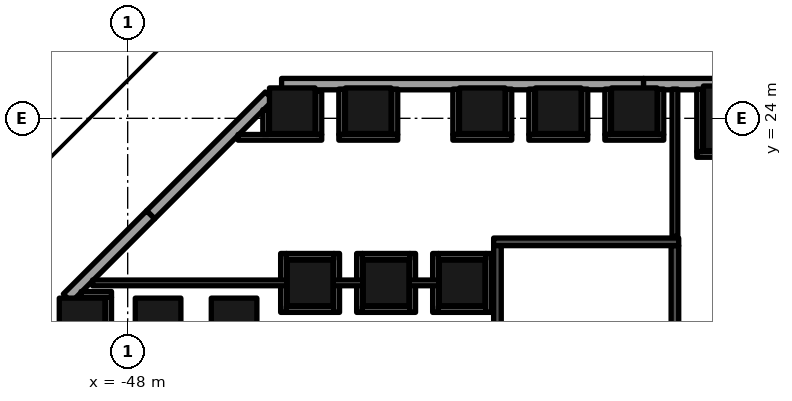
"""IFC4 building model, lengths in metres.
Left out: names, types, materials, properties, quantities, classifications, styles, units other than length and angle.
Written with IfcOpenShell. Run it as: python <this file> out.ifc"""

import sys

from ifc_helpers import new_model, si_unit, direction, frame, frame_2d, origin, origin_2d, place, context, subcontext, project, spatial, rectangle, extrude, element, fill, save


model = new_model("IFC4")
c1 = context("Model", 3, precision=1e-05, world=origin(), true_north=direction((0.0, 1.0)))
c2 = subcontext(c1, "Body", "Model", "MODEL_VIEW")
j1 = project(units=[si_unit("LENGTHUNIT", "METRE"), si_unit("PLANEANGLEUNIT", "RADIAN")], contexts=[c1])
p1 = place(None, origin())
s1 = spatial("IfcSite", under=j1, at=p1, CompositionType="ELEMENT")
p2 = place(p1, origin())
s2 = spatial("IfcBuilding", under=s1, at=p2, CompositionType="ELEMENT")
p3 = place(p2, origin())
s3 = spatial("IfcBuildingStorey", under=s2, at=p3, CompositionType="ELEMENT", Elevation=0.0)
p4 = place(p3, frame((-32.0, 24.0, 0.0), z_axis=(0.0, 0.0, 1.0), x_axis=(1.0, 0.0, 0.0)))
e1 = element("IfcColumn", 1, at=p4, inside=s3, PredefinedType="COLUMN", context=c2, shape_type="SweptSolid", body=[
    extrude(rectangle(XDim=1.7, YDim=1.7, at=origin_2d()), origin(), (0.0, 0.0, 1.0), 9.0),
])
for number, where, z_axis, x_axis in (
    (2, (-39.2, 19.669, 0.0), (0.0, 0.0, 1.0), (1.0, 0.0, 0.0)),
    (3, (-34.669, 24.2, 0.0), (0.0, 0.0, 1.0), (1.0, 0.0, 0.0)),
    (4, (-41.2, 19.669, 0.0), (0.0, 0.0, 1.0), (1.0, 0.0, 0.0)),
    (5, (-36.669, 24.2, 0.0), (0.0, 0.0, 1.0), (1.0, 0.0, 0.0)),
    (6, (-43.2, 19.669, 0.0), (0.0, 0.0, 1.0), (1.0, 0.0, 0.0)),
    (7, (-38.669, 24.2, 0.0), (0.0, 0.0, 1.0), (1.0, 0.0, 0.0)),
    (8, (-45.2, 18.669, 0.0), (0.0, 0.0, 1.0), (1.0, 0.0, 0.0)),
    (9, (-47.2, 18.669, 0.0), (0.0, 0.0, 1.0), (1.0, 0.0, 0.0)),
    (10, (-41.669, 24.2, 0.0), (0.0, 0.0, 1.0), (1.0, 0.0, 0.0)),
    (11, (-49.2, 18.669, 0.0), (0.0, 0.0, 1.0), (1.0, 0.0, 0.0)),
    (12, (-43.669, 24.2, 0.0), (0.0, 0.0, 1.0), (1.0, 0.0, 0.0)),
):
    element("IfcColumn", number, at=place(p3, frame(where, z_axis=z_axis, x_axis=x_axis)), inside=s3, PredefinedType="COLUMN", context=c2, shape_type="SweptSolid", body=[
        extrude(rectangle(XDim=1.2, YDim=1.2, at=origin_2d()), origin(), (0.0, 0.0, 1.0), 9.0),
    ])
for number, where, z_axis, x_axis in (
    (13, (-24.904, 24.9, 0.0), (0.0, 0.0, 1.0), (-1.0, 0.0, 0.0)),
    (14, (-34.427, 24.9, 0.0), (0.0, 0.0, 1.0), (-1.0, 0.0, 0.0)),
):
    element("IfcWall", number, at=place(p3, frame(where, z_axis=z_axis, x_axis=x_axis)), inside=s3, PredefinedType="SOLIDWALL", context=c2, shape_type="SweptSolid", body=[
        extrude(rectangle(XDim=9.523, YDim=0.3, at=frame_2d((4.761, 0.0))), origin(), (0.0, 0.0, 1.0), 7.6),
    ])
p5 = place(p3, frame((-44.271, 24.588, 0.0), z_axis=(0.0, 0.0, 1.0), x_axis=(-0.707079166839, -0.707134394455, 0.0)))
e15 = element("IfcWall", 15, at=p5, inside=s3, PredefinedType="ELEMENTEDWALL", context=c2, shape_type="SweptSolid", body=[
    extrude(rectangle(XDim=4.421, YDim=0.3, at=frame_2d((2.21, 0.0))), origin(), (0.0, 0.0, 1.0), 7.6),
])
p6 = place(p5, frame((1.021, 0.0, 0.0)))
e16 = element("IfcOpeningElement", 16, at=p6, cuts=e15, PredefinedType="OPENING", context=c2, shape_type="SweptSolid", body=[
    extrude(rectangle(XDim=3.0, YDim=2.7, at=frame_2d((1.5, 1.35))), frame((0.0, 0.16, 0.0), z_axis=(0.0, -1.0, 0.0), x_axis=(1.0, 0.0, 0.0)), (0.0, 0.0, 1.0), 0.32),
])
p7 = place(p3, frame((-47.397, 21.462, 0.0), z_axis=(0.0, 0.0, 1.0), x_axis=(-0.707146179809, -0.707067380369, 0.0)))
e17 = element("IfcWall", 17, at=p7, inside=s3, PredefinedType="SOLIDWALL", context=c2, shape_type="SweptSolid", body=[
    extrude(rectangle(XDim=3.098, YDim=0.3, at=frame_2d((1.549, 0.0))), origin(), (0.0, 0.0, 1.0), 7.6),
])
p8 = place(p3, frame((-42.75, 24.85, 9.0), z_axis=(0.0, 0.0, 1.0), x_axis=(-1.0, 0.0, 0.0)))
e18 = element("IfcWall", 18, at=p8, inside=s3, PredefinedType="PARAPET", context=c2, shape_type="SweptSolid", body=[
    extrude(rectangle(XDim=1.25, YDim=0.3, at=frame_2d((0.625, 0.0))), origin(), (0.0, 0.0, 1.0), 1.1),
])
p9 = place(p3, frame((-44.042, 24.745, 9.0), z_axis=(0.0, 0.0, 1.0), x_axis=(-0.7071215324, -0.707092029666, 0.0)))
e19 = element("IfcWall", 19, at=p9, inside=s3, PredefinedType="PARAPET", context=c2, shape_type="SweptSolid", body=[
    extrude(rectangle(XDim=8.275, YDim=0.3, at=frame_2d((4.138, 0.0))), origin(), (0.0, 0.0, 1.0), 1.1),
])
p10 = place(p3, frame((-49.85, 18.79, 9.0), z_axis=(0.0, 0.0, 1.0), x_axis=(0.0, -1.0, 0.0)))
e20 = element("IfcWall", 20, at=p10, inside=s3, PredefinedType="PARAPET", context=c2, shape_type="SweptSolid", body=[
    extrude(rectangle(XDim=14.698, YDim=0.3, at=frame_2d((7.349, 0.0))), origin(), (0.0, 0.0, 1.0), 1.1),
])
p11 = place(p3, frame((-38.37, 20.75, 0.0), z_axis=(0.0, 0.0, 1.0), x_axis=(1.0, 0.0, 0.0)))
e21 = element("IfcWall", 21, at=p11, inside=s3, PredefinedType="SOLIDWALL", context=c2, shape_type="SweptSolid", body=[
    extrude(rectangle(XDim=4.87, YDim=0.2, at=frame_2d((2.435, 0.0))), origin(), (0.0, 0.0, 1.0), 8.5),
])
p12 = place(p3, frame((-38.27, 14.0, 0.0), z_axis=(0.0, 0.0, 1.0), x_axis=(0.0, 1.0, 0.0)))
e22 = element("IfcWall", 22, at=p12, inside=s3, PredefinedType="SOLIDWALL", context=c2, shape_type="SweptSolid", body=[
    extrude(rectangle(XDim=6.65, YDim=0.2, at=frame_2d((3.325, 0.0))), origin(), (0.0, 0.0, 1.0), 8.5),
])
p13 = place(p12, frame((0.1, 0.0, 0.0)))
e23 = element("IfcOpeningElement", 23, at=p13, cuts=e22, PredefinedType="OPENING", context=c2, shape_type="SweptSolid", body=[
    extrude(rectangle(XDim=1.8, YDim=2.4, at=frame_2d((0.9, 1.2))), frame((0.0, 0.11, 0.0), z_axis=(0.0, -1.0, 0.0), x_axis=(1.0, 0.0, 0.0)), (0.0, 0.0, 1.0), 0.22),
])
p14 = place(p3, frame((-33.6, 14.0, 0.0), z_axis=(0.0, 0.0, 1.0), x_axis=(0.0, 1.0, 0.0)))
e24 = element("IfcWall", 24, at=p14, inside=s3, PredefinedType="SOLIDWALL", context=c2, shape_type="SweptSolid", body=[
    extrude(rectangle(XDim=6.65, YDim=0.2, at=frame_2d((3.325, 0.0))), origin(), (0.0, 0.0, 1.0), 8.5),
])
p15 = place(p14, frame((0.1, 0.0, 0.0)))
e25 = element("IfcOpeningElement", 25, at=p15, cuts=e24, PredefinedType="OPENING", context=c2, shape_type="SweptSolid", body=[
    extrude(rectangle(XDim=1.8, YDim=2.4, at=frame_2d((0.9, 1.2))), frame((0.0, 0.11, 0.0), z_axis=(0.0, -1.0, 0.0), x_axis=(1.0, 0.0, 0.0)), (0.0, 0.0, 1.0), 0.22),
])
p16 = place(p3, frame((-48.5, 18.044, 0.0), z_axis=(0.0, 0.0, 1.0), x_axis=(0.0, 1.0, 0.0)))
e26 = element("IfcWall", 26, at=p16, inside=s3, PredefinedType="PARTITIONING", context=c2, shape_type="SweptSolid", body=[
    extrude(rectangle(XDim=1.25, YDim=0.15, at=frame_2d((0.625, 0.0))), origin(), (0.0, 0.0, 1.0), 8.5),
])
p17 = place(p3, frame((-43.9, 18.894, 0.0), z_axis=(0.0, 0.0, 1.0), x_axis=(0.0, 1.0, 0.0)))
e27 = element("IfcWall", 27, at=p17, inside=s3, PredefinedType="PARTITIONING", context=c2, shape_type="SweptSolid", body=[
    extrude(rectangle(XDim=1.55, YDim=0.15, at=frame_2d((0.775, 0.0))), origin(), (0.0, 0.0, 1.0), 8.5),
])
p18 = place(p3, frame((-43.825, 18.969, 0.0), z_axis=(0.0, 0.0, 1.0), x_axis=(1.0, 0.0, 0.0)))
e28 = element("IfcWall", 28, at=p18, inside=s3, PredefinedType="PARTITIONING", context=c2, shape_type="SweptSolid", body=[
    extrude(rectangle(XDim=1.25, YDim=0.15, at=frame_2d((0.625, 0.0))), origin(), (0.0, 0.0, 1.0), 8.5),
])
for number, where, z_axis, x_axis in (
    (29, (-42.5, 18.894, 0.0), (0.0, 0.0, 1.0), (0.0, 1.0, 0.0)),
    (30, (-41.9, 18.894, 0.0), (0.0, 0.0, 1.0), (0.0, 1.0, 0.0)),
):
    element("IfcWall", number, at=place(p3, frame(where, z_axis=z_axis, x_axis=x_axis)), inside=s3, PredefinedType="PARTITIONING", context=c2, shape_type="SweptSolid", body=[
        extrude(rectangle(XDim=1.55, YDim=0.15, at=frame_2d((0.775, 0.0))), origin(), (0.0, 0.0, 1.0), 8.5),
    ])
p19 = place(p3, frame((-41.825, 18.969, 0.0), z_axis=(0.0, 0.0, 1.0), x_axis=(1.0, 0.0, 0.0)))
e31 = element("IfcWall", 31, at=p19, inside=s3, PredefinedType="PARTITIONING", context=c2, shape_type="SweptSolid", body=[
    extrude(rectangle(XDim=1.25, YDim=0.15, at=frame_2d((0.625, 0.0))), origin(), (0.0, 0.0, 1.0), 8.5),
])
for number, where, z_axis, x_axis in (
    (32, (-40.5, 18.894, 0.0), (0.0, 0.0, 1.0), (0.0, 1.0, 0.0)),
    (33, (-39.9, 18.894, 0.0), (0.0, 0.0, 1.0), (0.0, 1.0, 0.0)),
):
    element("IfcWall", number, at=place(p3, frame(where, z_axis=z_axis, x_axis=x_axis)), inside=s3, PredefinedType="PARTITIONING", context=c2, shape_type="SweptSolid", body=[
        extrude(rectangle(XDim=1.55, YDim=0.15, at=frame_2d((0.775, 0.0))), origin(), (0.0, 0.0, 1.0), 8.5),
    ])
p20 = place(p3, frame((-39.825, 18.969, 0.0), z_axis=(0.0, 0.0, 1.0), x_axis=(1.0, 0.0, 0.0)))
e34 = element("IfcWall", 34, at=p20, inside=s3, PredefinedType="PARTITIONING", context=c2, shape_type="SweptSolid", body=[
    extrude(rectangle(XDim=1.25, YDim=0.15, at=frame_2d((0.625, 0.0))), origin(), (0.0, 0.0, 1.0), 8.5),
])
p21 = place(p3, frame((-38.5, 18.894, 0.0), z_axis=(0.0, 0.0, 1.0), x_axis=(0.0, 1.0, 0.0)))
e35 = element("IfcWall", 35, at=p21, inside=s3, PredefinedType="PARTITIONING", context=c2, shape_type="SweptSolid", body=[
    extrude(rectangle(XDim=1.55, YDim=0.15, at=frame_2d((0.775, 0.0))), origin(), (0.0, 0.0, 1.0), 8.5),
])
p22 = place(p3, frame((-49.227, 19.369, 0.0), z_axis=(0.0, 0.0, 1.0), x_axis=(1.0, 0.0, 0.0)))
e36 = element("IfcWall", 36, at=p22, inside=s3, PredefinedType="PARTITIONING", context=c2, shape_type="SweptSolid", body=[
    extrude(rectangle(XDim=0.802, YDim=0.15, at=frame_2d((0.401, 0.0))), origin(), (0.0, 0.0, 1.0), 8.5),
])
p23 = place(p3, frame((-48.926, 19.67, 0.0), z_axis=(0.0, 0.0, 1.0), x_axis=(1.0, 0.0, 0.0)))
e37 = element("IfcWall", 37, at=p23, inside=s3, PredefinedType="PARTITIONING", context=c2, shape_type="SweptSolid", body=[
    extrude(rectangle(XDim=5.126, YDim=0.15, at=frame_2d((2.563, 0.0))), origin(), (0.0, 0.0, 1.0), 7.6),
])
for number, where, z_axis, x_axis in (
    (38, (-42.6, 19.67, 0.0), (0.0, 0.0, 1.0), (1.0, 0.0, 0.0)),
    (39, (-40.6, 19.67, 0.0), (0.0, 0.0, 1.0), (1.0, 0.0, 0.0)),
):
    element("IfcWall", number, at=place(p3, frame(where, z_axis=z_axis, x_axis=x_axis)), inside=s3, PredefinedType="PARTITIONING", context=c2, shape_type="SweptSolid", body=[
        extrude(rectangle(XDim=0.8, YDim=0.15, at=frame_2d((0.4, 0.0))), origin(), (0.0, 0.0, 1.0), 8.5),
    ])
for number, where, z_axis, x_axis in (
    (40, (-43.825, 20.369, 0.0), (0.0, 0.0, 1.0), (1.0, 0.0, 0.0)),
    (41, (-41.825, 20.369, 0.0), (0.0, 0.0, 1.0), (1.0, 0.0, 0.0)),
    (42, (-39.825, 20.369, 0.0), (0.0, 0.0, 1.0), (1.0, 0.0, 0.0)),
):
    element("IfcWall", number, at=place(p3, frame(where, z_axis=z_axis, x_axis=x_axis)), inside=s3, PredefinedType="PARTITIONING", context=c2, shape_type="SweptSolid", body=[
        extrude(rectangle(XDim=1.25, YDim=0.15, at=frame_2d((0.625, 0.0))), origin(), (0.0, 0.0, 1.0), 8.5),
    ])
p24 = place(p3, frame((-33.6, 20.89, 0.0), z_axis=(0.0, 0.0, 1.0), x_axis=(0.0, 1.0, 0.0)))
e43 = element("IfcWall", 43, at=p24, inside=s3, PredefinedType="PARTITIONING", context=c2, shape_type="SweptSolid", body=[
    extrude(rectangle(XDim=3.88, YDim=0.15, at=frame_2d((1.94, 0.0))), origin(), (0.0, 0.0, 1.0), 7.6),
])
p25 = place(p24, frame((0.661, 0.0, 0.0)))
e44 = element("IfcOpeningElement", 44, at=p25, cuts=e43, PredefinedType="OPENING", context=c2, shape_type="SweptSolid", body=[
    extrude(rectangle(XDim=1.2, YDim=2.1, at=frame_2d((0.6, 1.05))), frame((0.0, 0.085, 0.0), z_axis=(0.0, -1.0, 0.0), x_axis=(1.0, 0.0, 0.0)), (0.0, 0.0, 1.0), 0.17),
])
p26 = place(p3, frame((-33.025, 23.05, 0.0), z_axis=(0.0, 0.0, 1.0), x_axis=(1.0, 0.0, 0.0)))
e45 = element("IfcWall", 45, at=p26, inside=s3, PredefinedType="PARTITIONING", context=c2, shape_type="SweptSolid", body=[
    extrude(rectangle(XDim=2.05, YDim=0.15, at=frame_2d((1.025, 0.0))), origin(), (0.0, 0.0, 1.0), 7.3),
])
p27 = place(p3, frame((-32.95, 23.125, 0.0), z_axis=(0.0, 0.0, 1.0), x_axis=(0.0, 1.0, 0.0)))
e46 = element("IfcWall", 46, at=p27, inside=s3, PredefinedType="PARTITIONING", context=c2, shape_type="SweptSolid", body=[
    extrude(rectangle(XDim=1.645, YDim=0.15, at=frame_2d((0.823, 0.0))), origin(), (0.0, 0.0, 1.0), 7.6),
])
p28 = place(p3, frame((-45.096, 23.5, 0.0), z_axis=(0.0, 0.0, 1.0), x_axis=(1.0, 0.0, 0.0)))
e47 = element("IfcWall", 47, at=p28, inside=s3, PredefinedType="PARTITIONING", context=c2, shape_type="SweptSolid", body=[
    extrude(rectangle(XDim=2.202, YDim=0.15, at=frame_2d((1.101, 0.0))), origin(), (0.0, 0.0, 1.0), 7.6),
])
for number, where, z_axis, x_axis in (
    (48, (-42.444, 23.5, 0.0), (0.0, 0.0, 1.0), (1.0, 0.0, 0.0)),
    (49, (-39.444, 23.5, 0.0), (0.0, 0.0, 1.0), (1.0, 0.0, 0.0)),
    (50, (-37.444, 23.5, 0.0), (0.0, 0.0, 1.0), (1.0, 0.0, 0.0)),
    (51, (-35.444, 23.5, 0.0), (0.0, 0.0, 1.0), (1.0, 0.0, 0.0)),
):
    element("IfcWall", number, at=place(p3, frame(where, z_axis=z_axis, x_axis=x_axis)), inside=s3, PredefinedType="PARTITIONING", context=c2, shape_type="SweptSolid", body=[
        extrude(rectangle(XDim=1.55, YDim=0.15, at=frame_2d((0.775, 0.0))), origin(), (0.0, 0.0, 1.0), 8.5),
    ])
p29 = place(p3, frame((-44.369, 23.575, 0.0), z_axis=(0.0, 0.0, 1.0), x_axis=(0.0, 1.0, 0.0)))
e52 = element("IfcWall", 52, at=p29, inside=s3, PredefinedType="PARTITIONING", context=c2, shape_type="SweptSolid", body=[
    extrude(rectangle(XDim=0.652, YDim=0.15, at=frame_2d((0.326, 0.0))), origin(), (0.0, 0.0, 1.0), 8.5),
])
p30 = place(p3, frame((-42.969, 23.575, 0.0), z_axis=(0.0, 0.0, 1.0), x_axis=(0.0, 1.0, 0.0)))
e53 = element("IfcWall", 53, at=p30, inside=s3, PredefinedType="PARTITIONING", context=c2, shape_type="SweptSolid", body=[
    extrude(rectangle(XDim=1.145, YDim=0.15, at=frame_2d((0.573, 0.0))), origin(), (0.0, 0.0, 1.0), 8.5),
])
p31 = place(p3, frame((-42.369, 23.575, 0.0), z_axis=(0.0, 0.0, 1.0), x_axis=(0.0, 1.0, 0.0)))
e54 = element("IfcWall", 54, at=p31, inside=s3, PredefinedType="PARTITIONING", context=c2, shape_type="SweptSolid", body=[
    extrude(rectangle(XDim=1.195, YDim=0.15, at=frame_2d((0.598, 0.0))), origin(), (0.0, 0.0, 1.0), 8.5),
])
for number, where, z_axis, x_axis in (
    (55, (-40.969, 23.575, 0.0), (0.0, 0.0, 1.0), (0.0, 1.0, 0.0)),
    (56, (-39.369, 23.575, 0.0), (0.0, 0.0, 1.0), (0.0, 1.0, 0.0)),
):
    element("IfcWall", number, at=place(p3, frame(where, z_axis=z_axis, x_axis=x_axis)), inside=s3, PredefinedType="PARTITIONING", context=c2, shape_type="SweptSolid", body=[
        extrude(rectangle(XDim=1.195, YDim=0.15, at=frame_2d((0.598, 0.0))), origin(), (0.0, 0.0, 1.0), 7.3),
    ])
for number, where, z_axis, x_axis in (
    (57, (-37.969, 23.575, 0.0), (0.0, 0.0, 1.0), (0.0, 1.0, 0.0)),
    (58, (-37.369, 23.575, 0.0), (0.0, 0.0, 1.0), (0.0, 1.0, 0.0)),
    (59, (-35.969, 23.575, 0.0), (0.0, 0.0, 1.0), (0.0, 1.0, 0.0)),
    (60, (-35.369, 23.575, 0.0), (0.0, 0.0, 1.0), (0.0, 1.0, 0.0)),
):
    element("IfcWall", number, at=place(p3, frame(where, z_axis=z_axis, x_axis=x_axis)), inside=s3, PredefinedType="PARTITIONING", context=c2, shape_type="SweptSolid", body=[
        extrude(rectangle(XDim=1.195, YDim=0.15, at=frame_2d((0.598, 0.0))), origin(), (0.0, 0.0, 1.0), 8.5),
    ])
p32 = place(p3, frame((-33.969, 23.575, 0.0), z_axis=(0.0, 0.0, 1.0), x_axis=(0.0, 1.0, 0.0)))
e61 = element("IfcWall", 61, at=p32, inside=s3, PredefinedType="PARTITIONING", context=c2, shape_type="SweptSolid", body=[
    extrude(rectangle(XDim=1.195, YDim=0.15, at=frame_2d((0.598, 0.0))), origin(), (0.0, 0.0, 1.0), 7.6),
])
p33 = place(p6, origin())
e62 = element("IfcDoor", 62, at=p33, inside=s3, OperationType="DOUBLE_DOOR_SINGLE_SWING", PredefinedType="DOOR", context=c2, shape_type="SweptSolid", body=[
    extrude(rectangle(XDim=3.0, YDim=2.7, at=frame_2d((1.5, 1.35))), frame((0.0, 0.025, 0.0), z_axis=(0.0, -1.0, 0.0), x_axis=(1.0, 0.0, 0.0)), (0.0, 0.0, 1.0), 0.05),
])
fill(e16, e62)
p34 = place(p25, origin())
e63 = element("IfcDoor", 63, at=p34, inside=s3, OperationType="SINGLE_SWING_RIGHT", PredefinedType="DOOR", context=c2, shape_type="SweptSolid", body=[
    extrude(rectangle(XDim=1.2, YDim=2.1, at=frame_2d((0.6, 1.05))), frame((0.0, 0.025, 0.0), z_axis=(0.0, -1.0, 0.0), x_axis=(1.0, 0.0, 0.0)), (0.0, 0.0, 1.0), 0.05),
])
fill(e44, e63)
save(model, sys.argv[1])
